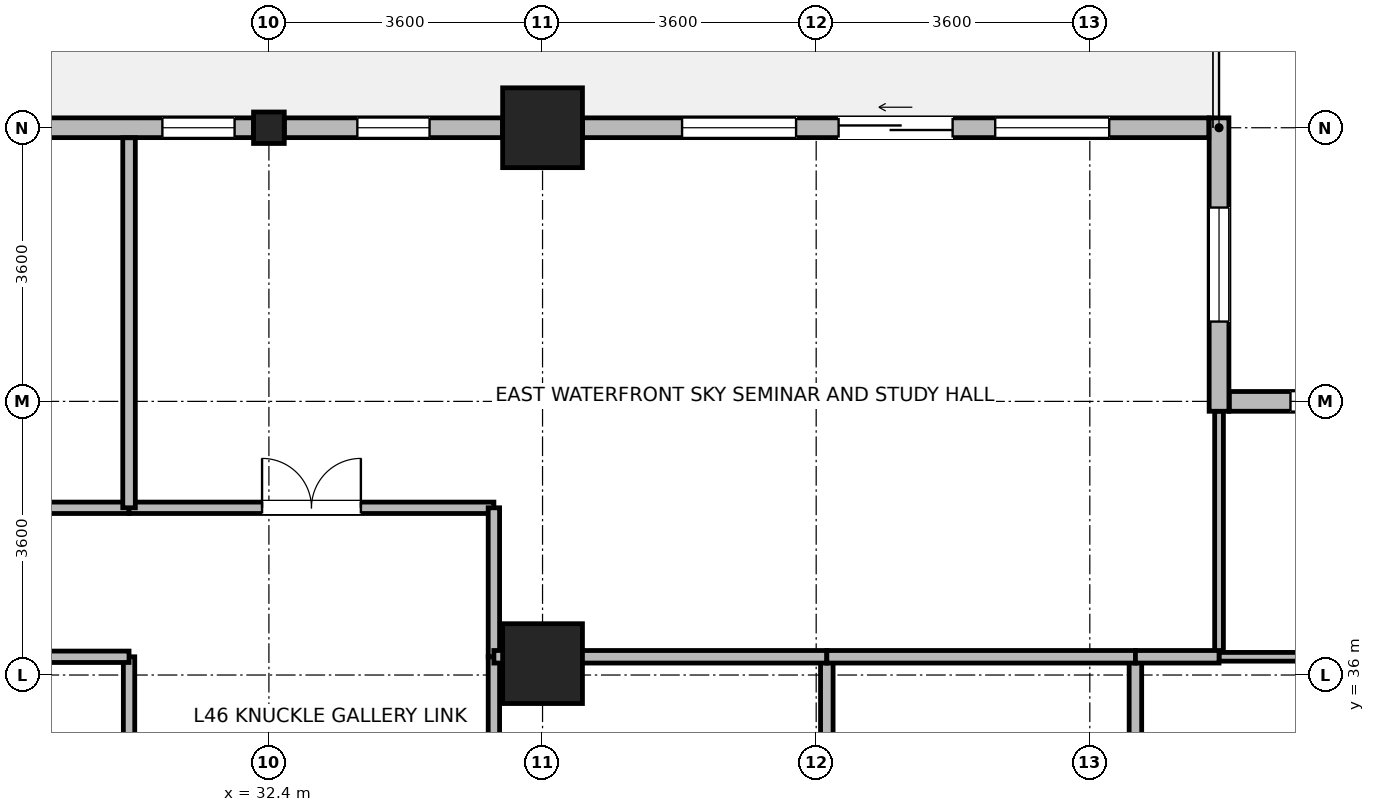
"""IFC4 building model, lengths in metres.
Left out: names, types, materials, properties, quantities, classifications, styles, units other than length and angle.
Written with IfcOpenShell. Run it as: python <this file> out.ifc"""

import sys

from ifc_helpers import new_model, si_unit, direction, frame, frame_2d, origin, origin_2d, place, context, subcontext, project, spatial, rectangle, i_section, extrude, source, transform, mapped, element, fill, save


model = new_model("IFC4")
c1 = context("Model", 3, precision=1e-05, world=origin(), true_north=direction((0.0, 1.0)))
c2 = subcontext(c1, "Body", "Model", "MODEL_VIEW")
j1 = project(units=[si_unit("LENGTHUNIT", "METRE"), si_unit("PLANEANGLEUNIT", "RADIAN")], contexts=[c1])
p1 = place(None, origin())
s1 = spatial("IfcSite", under=j1, at=p1, CompositionType="ELEMENT")
p2 = place(p1, origin())
s2 = spatial("IfcBuilding", under=s1, at=p2, CompositionType="ELEMENT")
p3 = place(p2, frame((0.0, 0.0, 180.9)))
s3 = spatial("IfcBuildingStorey", under=s2, at=p3, CompositionType="ELEMENT", Elevation=180.9)
m1 = source(origin(), c2, "Body", "SweptSolid", [
    extrude(rectangle(XDim=1.05, YDim=1.05, at=origin_2d()), origin(), (0.0, 0.0, 1.0), 3.7),
])
for number, where, z_axis, x_axis in (
    (1, (36.0, 43.2, 0.0), (0.0, 0.0, 1.0), (1.0, 0.0, 0.0)),
    (2, (36.0, 36.15, 0.0), (0.0, 0.0, 1.0), (1.0, 0.0, 0.0)),
):
    element("IfcColumn", number, at=place(p3, frame(where, z_axis=z_axis, x_axis=x_axis)), inside=s3, PredefinedType="COLUMN", context=c2, shape_type="MappedRepresentation", body=[
        mapped(m1, transform((0.0, 0.0, 0.0), x_axis=(1.0, 0.0, 0.0), y_axis=(0.0, 1.0, 0.0), z_axis=(0.0, 0.0, 1.0), scale=1.0)),
    ])
m2 = source(origin(), c2, "Body", "SweptSolid", [
    extrude(i_section(OverallWidth=0.404, OverallDepth=0.414, WebThickness=0.021, FlangeThickness=0.028, FilletRadius=0.015, at=origin_2d()), origin(), (0.0, 0.0, 1.0), 3.7),
])
p4 = place(p3, frame((32.4, 43.2, 0.0), z_axis=(0.0, 0.0, 1.0), x_axis=(1.0, 0.0, 0.0)))
e3 = element("IfcColumn", 3, at=p4, inside=s3, PredefinedType="COLUMN", context=c2, shape_type="MappedRepresentation", body=[
    mapped(m2, transform((0.0, 0.0, 0.0), x_axis=(1.0, 0.0, 0.0), y_axis=(0.0, 1.0, 0.0), z_axis=(0.0, 0.0, 1.0), scale=1.0)),
])
p5 = place(p3, frame((45.035, 39.6, 0.0), z_axis=(0.0, 0.0, 1.0), x_axis=(1.0, 0.0, 0.0)))
e4 = element("IfcWall", 4, at=p5, inside=s3, PredefinedType="STANDARD", context=c2, shape_type="SweptSolid", body=[
    extrude(rectangle(XDim=9.33, YDim=0.26, at=frame_2d((4.665, 0.0))), origin(), (0.0, 0.0, 1.0), 3.44),
])
p6 = place(p5, frame((0.805, 0.0, 0.85)))
e5 = element("IfcOpeningElement", 5, at=p6, cuts=e4, PredefinedType="OPENING", context=c2, shape_type="SweptSolid", body=[
    extrude(rectangle(XDim=1.5, YDim=1.85, at=frame_2d((0.75, 0.925))), frame((0.0, 0.14, 0.0), z_axis=(0.0, -1.0, 0.0), x_axis=(1.0, 0.0, 0.0)), (0.0, 0.0, 1.0), 0.28),
])
p7 = place(p5, frame((3.915, 0.0, 0.85)))
e6 = element("IfcOpeningElement", 6, at=p7, cuts=e4, PredefinedType="OPENING", context=c2, shape_type="SweptSolid", body=[
    extrude(rectangle(XDim=1.5, YDim=1.85, at=frame_2d((0.75, 0.925))), frame((0.0, 0.14, 0.0), z_axis=(0.0, -1.0, 0.0), x_axis=(1.0, 0.0, 0.0)), (0.0, 0.0, 1.0), 0.28),
])
p8 = place(p5, frame((7.025, 0.0, 0.85)))
e7 = element("IfcOpeningElement", 7, at=p8, cuts=e4, PredefinedType="OPENING", context=c2, shape_type="SweptSolid", body=[
    extrude(rectangle(XDim=1.5, YDim=1.85, at=frame_2d((0.75, 0.925))), frame((0.0, 0.14, 0.0), z_axis=(0.0, -1.0, 0.0), x_axis=(1.0, 0.0, 0.0)), (0.0, 0.0, 1.0), 0.28),
])
p9 = place(p3, frame((44.9, 43.33, 0.0), z_axis=(0.0, 0.0, 1.0), x_axis=(0.0, -1.0, 0.0)))
e8 = element("IfcWall", 8, at=p9, inside=s3, PredefinedType="STANDARD", context=c2, shape_type="SweptSolid", body=[
    extrude(rectangle(XDim=3.86, YDim=0.26, at=frame_2d((1.93, 0.0))), origin(), (0.0, 0.0, 1.0), 3.44),
])
p10 = place(p9, frame((1.18, 0.0, 0.85)))
e9 = element("IfcOpeningElement", 9, at=p10, cuts=e8, PredefinedType="OPENING", context=c2, shape_type="SweptSolid", body=[
    extrude(rectangle(XDim=1.5, YDim=1.85, at=frame_2d((0.75, 0.925))), frame((0.0, 0.14, 0.0), z_axis=(0.0, -1.0, 0.0), x_axis=(1.0, 0.0, 0.0)), (0.0, 0.0, 1.0), 0.28),
])
p11 = place(p3, frame((36.526, 43.2, 0.0), z_axis=(0.0, 0.0, 1.0), x_axis=(1.0, 0.0, 0.0)))
e10 = element("IfcWall", 10, at=p11, inside=s3, PredefinedType="STANDARD", context=c2, shape_type="SweptSolid", body=[
    extrude(rectangle(XDim=8.239, YDim=0.26, at=frame_2d((4.12, 0.0))), origin(), (0.0, 0.0, 1.0), 2.99),
])
p12 = place(p11, frame((3.369, 0.0, 0.0)))
e11 = element("IfcOpeningElement", 11, at=p12, cuts=e10, PredefinedType="OPENING", context=c2, shape_type="SweptSolid", body=[
    extrude(rectangle(XDim=1.5, YDim=2.15, at=frame_2d((0.75, 1.075))), frame((0.0, 0.14, 0.0), z_axis=(0.0, -1.0, 0.0), x_axis=(1.0, 0.0, 0.0)), (0.0, 0.0, 1.0), 0.28),
])
p13 = place(p11, frame((1.31, 0.0, 0.85)))
e12 = element("IfcOpeningElement", 12, at=p13, cuts=e10, PredefinedType="OPENING", context=c2, shape_type="SweptSolid", body=[
    extrude(rectangle(XDim=1.5, YDim=1.85, at=frame_2d((0.75, 0.925))), frame((0.0, 0.14, 0.0), z_axis=(0.0, -1.0, 0.0), x_axis=(1.0, 0.0, 0.0)), (0.0, 0.0, 1.0), 0.28),
])
p14 = place(p11, frame((5.429, 0.0, 0.85)))
e13 = element("IfcOpeningElement", 13, at=p14, cuts=e10, PredefinedType="OPENING", context=c2, shape_type="SweptSolid", body=[
    extrude(rectangle(XDim=1.5, YDim=1.85, at=frame_2d((0.75, 0.925))), frame((0.0, 0.14, 0.0), z_axis=(0.0, -1.0, 0.0), x_axis=(1.0, 0.0, 0.0)), (0.0, 0.0, 1.0), 0.28),
])
p15 = place(p3, frame((32.603, 43.2, 0.0), z_axis=(0.0, 0.0, 1.0), x_axis=(1.0, 0.0, 0.0)))
e14 = element("IfcWall", 14, at=p15, inside=s3, PredefinedType="STANDARD", context=c2, shape_type="SweptSolid", body=[
    extrude(rectangle(XDim=2.871, YDim=0.26, at=frame_2d((1.436, 0.0))), origin(), (0.0, 0.0, 1.0), 2.99),
])
p16 = place(p15, frame((0.96, 0.0, 0.85)))
e15 = element("IfcOpeningElement", 15, at=p16, cuts=e14, PredefinedType="OPENING", context=c2, shape_type="SweptSolid", body=[
    extrude(rectangle(XDim=0.95, YDim=1.75, at=frame_2d((0.475, 0.875))), frame((0.0, 0.14, 0.0), z_axis=(0.0, -1.0, 0.0), x_axis=(1.0, 0.0, 0.0)), (0.0, 0.0, 1.0), 0.28),
])
p17 = place(p3, frame((29.326, 43.2, 0.0), z_axis=(0.0, 0.0, 1.0), x_axis=(1.0, 0.0, 0.0)))
e16 = element("IfcWall", 16, at=p17, inside=s3, PredefinedType="STANDARD", context=c2, shape_type="SweptSolid", body=[
    extrude(rectangle(XDim=2.871, YDim=0.26, at=frame_2d((1.436, 0.0))), origin(), (0.0, 0.0, 1.0), 2.99),
])
p18 = place(p17, frame((1.673, 0.0, 0.85)))
e17 = element("IfcOpeningElement", 17, at=p18, cuts=e16, PredefinedType="OPENING", context=c2, shape_type="SweptSolid", body=[
    extrude(rectangle(XDim=0.95, YDim=1.75, at=frame_2d((0.475, 0.875))), frame((0.0, 0.14, 0.0), z_axis=(0.0, -1.0, 0.0), x_axis=(1.0, 0.0, 0.0)), (0.0, 0.0, 1.0), 0.28),
])
p19 = place(p3, frame((35.36, 28.56, 0.0), z_axis=(0.0, 0.0, 1.0), x_axis=(0.0, 1.0, 0.0)))
e18 = element("IfcWall", 18, at=p19, inside=s3, PredefinedType="PARTITIONING", context=c2, shape_type="SweptSolid", body=[
    extrude(rectangle(XDim=7.68, YDim=0.15, at=frame_2d((3.84, 0.0))), origin(), (0.0, 0.0, 1.0), 3.44),
])
p20 = place(p19, frame((3.19, 0.0, 0.0)))
e19 = element("IfcOpeningElement", 19, at=p20, cuts=e18, PredefinedType="OPENING", context=c2, shape_type="SweptSolid", body=[
    extrude(rectangle(XDim=1.3, YDim=2.12, at=frame_2d((0.65, 1.06))), frame((0.0, 0.085, 0.0), z_axis=(0.0, -1.0, 0.0), x_axis=(1.0, 0.0, 0.0)), (0.0, 0.0, 1.0), 0.17),
])
p21 = place(p3, frame((24.5, 38.2, 0.0), z_axis=(0.0, 0.0, 1.0), x_axis=(1.0, 0.0, 0.0)))
e20 = element("IfcWall", 20, at=p21, inside=s3, PredefinedType="PARTITIONING", context=c2, shape_type="SweptSolid", body=[
    extrude(rectangle(XDim=6.06, YDim=0.15, at=frame_2d((3.03, 0.0))), origin(), (0.0, 0.0, 1.0), 3.44),
])
p22 = place(p21, frame((2.58, 0.0, 0.0)))
e21 = element("IfcOpeningElement", 21, at=p22, cuts=e20, PredefinedType="OPENING", context=c2, shape_type="SweptSolid", body=[
    extrude(rectangle(XDim=0.9, YDim=2.08, at=frame_2d((0.45, 1.04))), frame((0.0, 0.085, 0.0), z_axis=(0.0, -1.0, 0.0), x_axis=(1.0, 0.0, 0.0)), (0.0, 0.0, 1.0), 0.17),
])
p23 = place(p3, frame((30.56, 38.2, 0.0), z_axis=(0.0, 0.0, 1.0), x_axis=(1.0, 0.0, 0.0)))
e22 = element("IfcWall", 22, at=p23, inside=s3, PredefinedType="PARTITIONING", context=c2, shape_type="SweptSolid", body=[
    extrude(rectangle(XDim=4.8, YDim=0.15, at=frame_2d((2.4, 0.0))), origin(), (0.0, 0.0, 1.0), 3.44),
])
p24 = place(p23, frame((1.75, 0.0, 0.0)))
e23 = element("IfcOpeningElement", 23, at=p24, cuts=e22, PredefinedType="OPENING", context=c2, shape_type="SweptSolid", body=[
    extrude(rectangle(XDim=1.3, YDim=2.12, at=frame_2d((0.65, 1.06))), frame((0.0, 0.085, 0.0), z_axis=(0.0, -1.0, 0.0), x_axis=(1.0, 0.0, 0.0)), (0.0, 0.0, 1.0), 0.17),
])
p25 = place(p3, frame((30.56, 32.4, 0.0), z_axis=(0.0, 0.0, 1.0), x_axis=(0.0, 1.0, 0.0)))
e24 = element("IfcWall", 24, at=p25, inside=s3, PredefinedType="PARTITIONING", context=c2, shape_type="SweptSolid", body=[
    extrude(rectangle(XDim=3.84, YDim=0.15, at=frame_2d((1.92, 0.0))), origin(), (0.0, 0.0, 1.0), 3.44),
])
p26 = place(p25, frame((1.27, 0.0, 0.0)))
e25 = element("IfcOpeningElement", 25, at=p26, cuts=e24, PredefinedType="OPENING", context=c2, shape_type="SweptSolid", body=[
    extrude(rectangle(XDim=1.3, YDim=2.12, at=frame_2d((0.65, 1.06))), frame((0.0, 0.085, 0.0), z_axis=(0.0, -1.0, 0.0), x_axis=(1.0, 0.0, 0.0)), (0.0, 0.0, 1.0), 0.17),
])
p27 = place(p3, frame((35.36, 36.24, 0.0), z_axis=(0.0, 0.0, 1.0), x_axis=(0.0, 1.0, 0.0)))
e26 = element("IfcWall", 26, at=p27, inside=s3, PredefinedType="PARTITIONING", context=c2, shape_type="SweptSolid", body=[
    extrude(rectangle(XDim=1.96, YDim=0.15, at=frame_2d((0.98, 0.0))), origin(), (0.0, 0.0, 1.0), 3.44),
])
p28 = place(p3, frame((29.325, 36.24, 0.0), z_axis=(0.0, 0.0, 1.0), x_axis=(1.0, 0.0, 0.0)))
e27 = element("IfcWall", 27, at=p28, inside=s3, PredefinedType="PARTITIONING", context=c2, shape_type="SweptSolid", body=[
    extrude(rectangle(XDim=1.235, YDim=0.15, at=frame_2d((0.618, 0.0))), origin(), (0.0, 0.0, 1.0), 2.84),
])
for number, where, z_axis, x_axis in (
    (28, (39.74, 28.56, 0.0), (0.0, 0.0, 1.0), (0.0, 1.0, 0.0)),
    (29, (43.8, 28.56, 0.0), (0.0, 0.0, 1.0), (0.0, 1.0, 0.0)),
):
    element("IfcWall", number, at=place(p3, frame(where, z_axis=z_axis, x_axis=x_axis)), inside=s3, PredefinedType="PARTITIONING", context=c2, shape_type="SweptSolid", body=[
        extrude(rectangle(XDim=7.68, YDim=0.165, at=frame_2d((3.84, 0.0))), origin(), (0.0, 0.0, 1.0), 3.44),
    ])
p29 = place(p3, frame((44.9, 36.24, 0.0), z_axis=(0.0, 0.0, 1.0), x_axis=(0.0, 1.0, 0.0)))
e30 = element("IfcWall", 30, at=p29, inside=s3, PredefinedType="PARTITIONING", context=c2, shape_type="SweptSolid", body=[
    extrude(rectangle(XDim=3.228, YDim=0.115, at=frame_2d((1.614, 0.0))), origin(), (0.0, 0.0, 1.0), 3.44),
])
p30 = place(p3, frame((30.56, 38.2, 0.0), z_axis=(0.0, 0.0, 1.0), x_axis=(0.0, 1.0, 0.0)))
e31 = element("IfcWall", 31, at=p30, inside=s3, PredefinedType="PARTITIONING", context=c2, shape_type="SweptSolid", body=[
    extrude(rectangle(XDim=4.868, YDim=0.165, at=frame_2d((2.434, 0.0))), origin(), (0.0, 0.0, 1.0), 3.44),
])
p31 = place(p3, frame((35.36, 36.24, 0.0), z_axis=(0.0, 0.0, 1.0), x_axis=(1.0, 0.0, 0.0)))
e32 = element("IfcWall", 32, at=p31, inside=s3, PredefinedType="PARTITIONING", context=c2, shape_type="SweptSolid", body=[
    extrude(rectangle(XDim=4.38, YDim=0.165, at=frame_2d((2.19, 0.0))), origin(), (0.0, 0.0, 1.0), 2.84),
])
p32 = place(p3, frame((39.74, 36.24, 0.0), z_axis=(0.0, 0.0, 1.0), x_axis=(1.0, 0.0, 0.0)))
e33 = element("IfcWall", 33, at=p32, inside=s3, PredefinedType="PARTITIONING", context=c2, shape_type="SweptSolid", body=[
    extrude(rectangle(XDim=4.06, YDim=0.165, at=frame_2d((2.03, 0.0))), origin(), (0.0, 0.0, 1.0), 2.84),
])
p33 = place(p3, frame((44.9, 36.24, 0.0), z_axis=(0.0, 0.0, 1.0), x_axis=(1.0, 0.0, 0.0)))
e34 = element("IfcWall", 34, at=p33, inside=s3, PredefinedType="PARTITIONING", context=c2, shape_type="SweptSolid", body=[
    extrude(rectangle(XDim=1.375, YDim=0.115, at=frame_2d((0.688, 0.0))), origin(), (0.0, 0.0, 1.0), 2.84),
])
p34 = place(p3, frame((43.8, 36.24, 0.0), z_axis=(0.0, 0.0, 1.0), x_axis=(1.0, 0.0, 0.0)))
e35 = element("IfcWall", 35, at=p34, inside=s3, PredefinedType="PARTITIONING", context=c2, shape_type="SweptSolid", body=[
    extrude(rectangle(XDim=1.1, YDim=0.165, at=frame_2d((0.55, 0.0))), origin(), (0.0, 0.0, 1.0), 2.84),
])
p35 = place(p6, origin())
e36 = element("IfcWindow", 36, at=p35, inside=s3, PartitioningType="SINGLE_PANEL", PredefinedType="WINDOW", context=c2, shape_type="SweptSolid", body=[
    extrude(rectangle(XDim=1.5, YDim=1.85, at=frame_2d((0.75, 0.925))), frame((0.0, 0.03, 0.0), z_axis=(0.0, -1.0, 0.0), x_axis=(1.0, 0.0, 0.0)), (0.0, 0.0, 1.0), 0.06),
])
fill(e5, e36)
p36 = place(p10, origin())
e37 = element("IfcWindow", 37, at=p36, inside=s3, PartitioningType="SINGLE_PANEL", PredefinedType="WINDOW", context=c2, shape_type="SweptSolid", body=[
    extrude(rectangle(XDim=1.5, YDim=1.85, at=frame_2d((0.75, 0.925))), frame((0.0, 0.03, 0.0), z_axis=(0.0, -1.0, 0.0), x_axis=(1.0, 0.0, 0.0)), (0.0, 0.0, 1.0), 0.06),
])
fill(e9, e37)
p37 = place(p12, origin())
e38 = element("IfcDoor", 38, at=p37, inside=s3, OperationType="SLIDING_TO_LEFT", PredefinedType="DOOR", context=c2, shape_type="SweptSolid", body=[
    extrude(rectangle(XDim=1.5, YDim=2.15, at=frame_2d((0.75, 1.075))), frame((0.0, 0.025, 0.0), z_axis=(0.0, -1.0, 0.0), x_axis=(1.0, 0.0, 0.0)), (0.0, 0.0, 1.0), 0.05),
])
fill(e11, e38)
p38 = place(p13, origin())
e39 = element("IfcWindow", 39, at=p38, inside=s3, PartitioningType="SINGLE_PANEL", PredefinedType="WINDOW", context=c2, shape_type="SweptSolid", body=[
    extrude(rectangle(XDim=1.5, YDim=1.85, at=frame_2d((0.75, 0.925))), frame((0.0, 0.03, 0.0), z_axis=(0.0, -1.0, 0.0), x_axis=(1.0, 0.0, 0.0)), (0.0, 0.0, 1.0), 0.06),
])
fill(e12, e39)
p39 = place(p14, origin())
e40 = element("IfcWindow", 40, at=p39, inside=s3, PartitioningType="SINGLE_PANEL", PredefinedType="WINDOW", context=c2, shape_type="SweptSolid", body=[
    extrude(rectangle(XDim=1.5, YDim=1.85, at=frame_2d((0.75, 0.925))), frame((0.0, 0.03, 0.0), z_axis=(0.0, -1.0, 0.0), x_axis=(1.0, 0.0, 0.0)), (0.0, 0.0, 1.0), 0.06),
])
fill(e13, e40)
p40 = place(p16, origin())
e41 = element("IfcWindow", 41, at=p40, inside=s3, PartitioningType="SINGLE_PANEL", PredefinedType="WINDOW", context=c2, shape_type="SweptSolid", body=[
    extrude(rectangle(XDim=0.95, YDim=1.75, at=frame_2d((0.475, 0.875))), frame((0.0, 0.03, 0.0), z_axis=(0.0, -1.0, 0.0), x_axis=(1.0, 0.0, 0.0)), (0.0, 0.0, 1.0), 0.06),
])
fill(e15, e41)
p41 = place(p18, origin())
e42 = element("IfcWindow", 42, at=p41, inside=s3, PartitioningType="SINGLE_PANEL", PredefinedType="WINDOW", context=c2, shape_type="SweptSolid", body=[
    extrude(rectangle(XDim=0.95, YDim=1.75, at=frame_2d((0.475, 0.875))), frame((0.0, 0.03, 0.0), z_axis=(0.0, -1.0, 0.0), x_axis=(1.0, 0.0, 0.0)), (0.0, 0.0, 1.0), 0.06),
])
fill(e17, e42)
p42 = place(p24, origin())
e43 = element("IfcDoor", 43, at=p42, inside=s3, OperationType="DOUBLE_DOOR_SINGLE_SWING", PredefinedType="DOOR", context=c2, shape_type="SweptSolid", body=[
    extrude(rectangle(XDim=1.3, YDim=2.12, at=frame_2d((0.65, 1.06))), frame((0.0, 0.025, 0.0), z_axis=(0.0, -1.0, 0.0), x_axis=(1.0, 0.0, 0.0)), (0.0, 0.0, 1.0), 0.05),
])
fill(e23, e43)
save(model, sys.argv[1])
